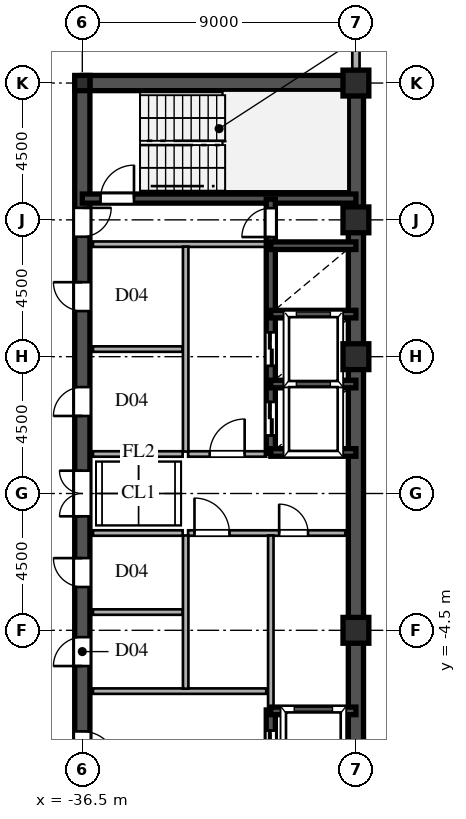
"""IFC4 building model, lengths in metres.
Left out: names, types, materials, properties, quantities, classifications, styles, units other than length and angle.
Written with IfcOpenShell. Run it as: python <this file> out.ifc"""

import sys

from ifc_helpers import new_model, si_unit, direction, frame, frame_2d, origin, origin_2d, place, context, subcontext, project, spatial, rectangle, hollow_rectangle, i_section, extrude, source, transform, mapped, element, fill, save


model = new_model("IFC4")
c1 = context("Model", 3, precision=1e-05, world=origin(), true_north=direction((0.0, 1.0)))
c2 = subcontext(c1, "Body", "Model", "MODEL_VIEW")
j1 = project(units=[si_unit("LENGTHUNIT", "METRE"), si_unit("PLANEANGLEUNIT", "RADIAN")], contexts=[c1])
p1 = place(None, origin())
s1 = spatial("IfcSite", under=j1, at=p1, CompositionType="ELEMENT")
p2 = place(p1, origin())
s2 = spatial("IfcBuilding", under=s1, at=p2, CompositionType="ELEMENT")
p3 = place(p2, frame((0.0, 0.0, 210.3)))
s3 = spatial("IfcBuildingStorey", under=s2, at=p3, CompositionType="ELEMENT", Elevation=210.3)
m1 = source(origin(), c2, "Body", "SweptSolid", [
    extrude(hollow_rectangle(XDim=0.85, YDim=0.85, WallThickness=0.036, at=origin_2d()), origin(), (0.0, 0.0, 1.0), 3.6),
])
for number, where, z_axis, x_axis in (
    (1, (-27.5, -4.5, 0.0), (0.0, 0.0, 1.0), (1.0, 0.0, 0.0)),
    (2, (-27.5, 4.5, 0.0), (0.0, 0.0, 1.0), (1.0, 0.0, 0.0)),
    (3, (-27.5, 9.0, 0.0), (0.0, 0.0, 1.0), (1.0, 0.0, 0.0)),
    (4, (-27.5, 13.5, 0.0), (0.0, 0.0, 1.0), (1.0, 0.0, 0.0)),
):
    element("IfcColumn", number, at=place(p3, frame(where, z_axis=z_axis, x_axis=x_axis)), inside=s3, PredefinedType="COLUMN", context=c2, shape_type="MappedRepresentation", body=[
        mapped(m1, transform((0.0, 0.0, 0.0), scale=1.0)),
    ])
m2 = source(origin(), c2, "Body", "SweptSolid", [
    extrude(i_section(OverallWidth=0.5, OverallDepth=0.5, WebThickness=0.02, FlangeThickness=0.032, at=origin_2d()), origin(), (0.0, 0.0, 1.0), 3.6),
])
p4 = place(p3, frame((-36.5, 13.5, 0.0), z_axis=(0.0, 0.0, 1.0), x_axis=(1.0, 0.0, 0.0)))
e5 = element("IfcColumn", 5, at=p4, inside=s3, PredefinedType="COLUMN", context=c2, shape_type="MappedRepresentation", body=[
    mapped(m2, transform((0.0, 0.0, 0.0), scale=1.0)),
])
p5 = place(p3, frame((-27.5, 13.755, 0.0), z_axis=(0.0, 0.0, 1.0), x_axis=(0.0, 1.0, 0.0)))
e6 = element("IfcWall", 6, at=p5, inside=s3, PredefinedType="SOLIDWALL", context=c2, shape_type="SweptSolid", body=[
    extrude(rectangle(XDim=0.62, YDim=0.24, at=frame_2d((0.31, 0.0))), origin(), (0.0, 0.0, 1.0), 2.88),
])
p6 = place(p3, frame((-27.5, 14.375, 0.0), z_axis=(0.0, 0.0, 1.0), x_axis=(0.0, 1.0, 0.0)))
e7 = element("IfcWall", 7, at=p6, inside=s3, PredefinedType="SOLIDWALL", context=c2, shape_type="SweptSolid", body=[
    extrude(rectangle(XDim=1.605, YDim=0.24, at=frame_2d((0.803, 0.0))), origin(), (0.0, 0.0, 1.0), 3.38),
])
for number, where, z_axis, x_axis in (
    (8, (-27.5, -13.5, 0.0), (0.0, 0.0, 1.0), (0.0, 1.0, 0.0)),
    (9, (-27.5, 1.3, 0.0), (0.0, 0.0, 1.0), (0.0, 1.0, 0.0)),
):
    element("IfcWall", number, at=place(p3, frame(where, z_axis=z_axis, x_axis=x_axis)), inside=s3, PredefinedType="SHEAR", context=c2, shape_type="SweptSolid", body=[
        extrude(rectangle(XDim=12.2, YDim=0.5, at=frame_2d((6.1, 0.0))), origin(), (0.0, 0.0, 1.0), 3.38),
    ])
p7 = place(p3, frame((-27.5, -1.3, 0.0), z_axis=(0.0, 0.0, 1.0), x_axis=(0.0, 1.0, 0.0)))
e10 = element("IfcWall", 10, at=p7, inside=s3, PredefinedType="SHEAR", context=c2, shape_type="SweptSolid", body=[
    extrude(rectangle(XDim=2.6, YDim=0.5, at=frame_2d((1.3, 0.0))), origin(), (0.0, 0.0, 1.0), 3.38),
])
p8 = place(p3, frame((-36.5, 13.5, 0.0), z_axis=(0.0, 0.0, 1.0), x_axis=(1.0, 0.0, 0.0)))
e11 = element("IfcWall", 11, at=p8, inside=s3, PredefinedType="SHEAR", context=c2, shape_type="SweptSolid", body=[
    extrude(rectangle(XDim=9.0, YDim=0.5, at=frame_2d((4.5, 0.0))), origin(), (0.0, 0.0, 1.0), 3.38),
])
p9 = place(p3, frame((-36.5, -13.65, 0.0), z_axis=(0.0, 0.0, 1.0), x_axis=(0.0, 1.0, 0.0)))
e12 = element("IfcWall", 12, at=p9, inside=s3, PredefinedType="SHEAR", context=c2, shape_type="SweptSolid", body=[
    extrude(rectangle(XDim=7.15, YDim=0.5, at=frame_2d((3.575, 0.0))), origin(), (0.0, 0.0, 1.0), 3.38),
])
p10 = place(p9, frame((4.675, 0.0, 0.0)))
e13 = element("IfcOpeningElement", 13, at=p10, cuts=e12, PredefinedType="OPENING", context=c2, shape_type="SweptSolid", body=[
    extrude(rectangle(XDim=1.15, YDim=2.2, at=frame_2d((0.575, 1.1))), frame((0.0, 0.26, 0.0), z_axis=(0.0, -1.0, 0.0), x_axis=(1.0, 0.0, 0.0)), (0.0, 0.0, 1.0), 0.52),
])
p11 = place(p3, frame((-36.5, -1.3, 0.0), z_axis=(0.0, 0.0, 1.0), x_axis=(0.0, 1.0, 0.0)))
e14 = element("IfcWall", 14, at=p11, inside=s3, PredefinedType="SHEAR", context=c2, shape_type="SweptSolid", body=[
    extrude(rectangle(XDim=2.6, YDim=0.5, at=frame_2d((1.3, 0.0))), origin(), (0.0, 0.0, 1.0), 3.38),
])
p12 = place(p11, frame((0.55, 0.0, 0.0)))
e15 = element("IfcOpeningElement", 15, at=p12, cuts=e14, PredefinedType="OPENING", context=c2, shape_type="SweptSolid", body=[
    extrude(rectangle(XDim=1.5, YDim=2.3, at=frame_2d((0.75, 1.15))), frame((0.0, 0.26, 0.0), z_axis=(0.0, -1.0, 0.0), x_axis=(1.0, 0.0, 0.0)), (0.0, 0.0, 1.0), 0.52),
])
p13 = place(p3, frame((-36.5, 8.2, 0.0), z_axis=(0.0, 0.0, 1.0), x_axis=(0.0, 1.0, 0.0)))
e16 = element("IfcWall", 16, at=p13, inside=s3, PredefinedType="SHEAR", context=c2, shape_type="SweptSolid", body=[
    extrude(rectangle(XDim=5.45, YDim=0.5, at=frame_2d((2.725, 0.0))), origin(), (0.0, 0.0, 1.0), 3.38),
])
p14 = place(p13, frame((0.245, 0.0, 0.0)))
e17 = element("IfcOpeningElement", 17, at=p14, cuts=e16, PredefinedType="OPENING", context=c2, shape_type="SweptSolid", body=[
    extrude(rectangle(XDim=0.95, YDim=2.15, at=frame_2d((0.475, 1.075))), frame((0.0, 0.26, 0.0), z_axis=(0.0, -1.0, 0.0), x_axis=(1.0, 0.0, 0.0)), (0.0, 0.0, 1.0), 0.52),
])
p15 = place(p3, frame((-36.5, -6.5, 0.0), z_axis=(0.0, 0.0, 1.0), x_axis=(0.0, 1.0, 0.0)))
e18 = element("IfcWall", 18, at=p15, inside=s3, PredefinedType="SHEAR", context=c2, shape_type="SweptSolid", body=[
    extrude(rectangle(XDim=2.6, YDim=0.5, at=frame_2d((1.3, 0.0))), origin(), (0.0, 0.0, 1.0), 3.38),
])
p16 = place(p15, frame((0.825, 0.0, 0.0)))
e19 = element("IfcOpeningElement", 19, at=p16, cuts=e18, PredefinedType="OPENING", context=c2, shape_type="SweptSolid", body=[
    extrude(rectangle(XDim=0.95, YDim=2.15, at=frame_2d((0.475, 1.075))), frame((0.0, 0.26, 0.0), z_axis=(0.0, -1.0, 0.0), x_axis=(1.0, 0.0, 0.0)), (0.0, 0.0, 1.0), 0.52),
])
p17 = place(p3, frame((-36.5, -3.9, 0.0), z_axis=(0.0, 0.0, 1.0), x_axis=(0.0, 1.0, 0.0)))
e20 = element("IfcWall", 20, at=p17, inside=s3, PredefinedType="SHEAR", context=c2, shape_type="SweptSolid", body=[
    extrude(rectangle(XDim=2.6, YDim=0.5, at=frame_2d((1.3, 0.0))), origin(), (0.0, 0.0, 1.0), 3.38),
])
p18 = place(p17, frame((0.825, 0.0, 0.0)))
e21 = element("IfcOpeningElement", 21, at=p18, cuts=e20, PredefinedType="OPENING", context=c2, shape_type="SweptSolid", body=[
    extrude(rectangle(XDim=0.95, YDim=2.15, at=frame_2d((0.475, 1.075))), frame((0.0, 0.26, 0.0), z_axis=(0.0, -1.0, 0.0), x_axis=(1.0, 0.0, 0.0)), (0.0, 0.0, 1.0), 0.52),
])
p19 = place(p3, frame((-36.5, 1.3, 0.0), z_axis=(0.0, 0.0, 1.0), x_axis=(0.0, 1.0, 0.0)))
e22 = element("IfcWall", 22, at=p19, inside=s3, PredefinedType="SHEAR", context=c2, shape_type="SweptSolid", body=[
    extrude(rectangle(XDim=3.45, YDim=0.5, at=frame_2d((1.725, 0.0))), origin(), (0.0, 0.0, 1.0), 3.38),
])
p20 = place(p19, frame((1.25, 0.0, 0.0)))
e23 = element("IfcOpeningElement", 23, at=p20, cuts=e22, PredefinedType="OPENING", context=c2, shape_type="SweptSolid", body=[
    extrude(rectangle(XDim=0.95, YDim=2.15, at=frame_2d((0.475, 1.075))), frame((0.0, 0.26, 0.0), z_axis=(0.0, -1.0, 0.0), x_axis=(1.0, 0.0, 0.0)), (0.0, 0.0, 1.0), 0.52),
])
p21 = place(p3, frame((-36.5, 4.75, 0.0), z_axis=(0.0, 0.0, 1.0), x_axis=(0.0, 1.0, 0.0)))
e24 = element("IfcWall", 24, at=p21, inside=s3, PredefinedType="SHEAR", context=c2, shape_type="SweptSolid", body=[
    extrude(rectangle(XDim=3.45, YDim=0.5, at=frame_2d((1.725, 0.0))), origin(), (0.0, 0.0, 1.0), 3.38),
])
p22 = place(p21, frame((1.25, 0.0, 0.0)))
e25 = element("IfcOpeningElement", 25, at=p22, cuts=e24, PredefinedType="OPENING", context=c2, shape_type="SweptSolid", body=[
    extrude(rectangle(XDim=0.95, YDim=2.15, at=frame_2d((0.475, 1.075))), frame((0.0, 0.26, 0.0), z_axis=(0.0, -1.0, 0.0), x_axis=(1.0, 0.0, 0.0)), (0.0, 0.0, 1.0), 0.52),
])
p23 = place(p3, frame((-36.5, 9.7, 0.0), z_axis=(0.0, 0.0, 1.0), x_axis=(1.0, 0.0, 0.0)))
e26 = element("IfcWall", 26, at=p23, inside=s3, PredefinedType="SHEAR", context=c2, shape_type="SweptSolid", body=[
    extrude(rectangle(XDim=9.0, YDim=0.3, at=frame_2d((4.5, 0.0))), origin(), (0.0, 0.0, 1.0), 3.38),
])
p24 = place(p23, frame((0.6, 0.0, 0.0)))
e27 = element("IfcOpeningElement", 27, at=p24, cuts=e26, PredefinedType="OPENING", context=c2, shape_type="SweptSolid", body=[
    extrude(rectangle(XDim=1.1, YDim=2.2, at=frame_2d((0.55, 1.1))), frame((0.0, 0.16, 0.0), z_axis=(0.0, -1.0, 0.0), x_axis=(1.0, 0.0, 0.0)), (0.0, 0.0, 1.0), 0.32),
])
for number, where, z_axis, x_axis in (
    (28, (-30.3, -7.15, 0.0), (0.0, 0.0, 1.0), (1.0, 0.0, 0.0)),
    (29, (-30.3, 1.35, 0.0), (0.0, 0.0, 1.0), (1.0, 0.0, 0.0)),
    (30, (-30.3, 3.6, 0.0), (0.0, 0.0, 1.0), (1.0, 0.0, 0.0)),
    (31, (-30.3, 5.9, 0.0), (0.0, 0.0, 1.0), (1.0, 0.0, 0.0)),
    (32, (-30.3, 8.15, 0.0), (0.0, 0.0, 1.0), (1.0, 0.0, 0.0)),
):
    element("IfcWall", number, at=place(p3, frame(where, z_axis=z_axis, x_axis=x_axis)), inside=s3, PredefinedType="SHEAR", context=c2, shape_type="SweptSolid", body=[
        extrude(rectangle(XDim=2.8, YDim=0.25, at=frame_2d((1.4, 0.0))), origin(), (0.0, 0.0, 1.0), 3.38),
    ])
p25 = place(p3, frame((-30.3, -9.68, 0.0), z_axis=(0.0, 0.0, 1.0), x_axis=(0.0, 1.0, 0.0)))
e33 = element("IfcWall", 33, at=p25, inside=s3, PredefinedType="SHEAR", context=c2, shape_type="SweptSolid", body=[
    extrude(rectangle(XDim=2.56, YDim=0.3, at=frame_2d((1.28, 0.0))), origin(), (0.0, 0.0, 1.0), 3.38),
])
p26 = place(p25, frame((0.68, 0.0, 0.0)))
e34 = element("IfcOpeningElement", 34, at=p26, cuts=e33, PredefinedType="OPENING", context=c2, shape_type="SweptSolid", body=[
    extrude(rectangle(XDim=1.2, YDim=2.25, at=frame_2d((0.6, 1.125))), frame((0.0, 0.16, 0.0), z_axis=(0.0, -1.0, 0.0), x_axis=(1.0, 0.0, 0.0)), (0.0, 0.0, 1.0), 0.32),
])
p27 = place(p3, frame((-30.3, 1.32, 0.0), z_axis=(0.0, 0.0, 1.0), x_axis=(0.0, 1.0, 0.0)))
e35 = element("IfcWall", 35, at=p27, inside=s3, PredefinedType="SHEAR", context=c2, shape_type="SweptSolid", body=[
    extrude(rectangle(XDim=2.28, YDim=0.3, at=frame_2d((1.14, 0.0))), origin(), (0.0, 0.0, 1.0), 3.38),
])
p28 = place(p27, frame((0.59, 0.0, 0.0)))
e36 = element("IfcOpeningElement", 36, at=p28, cuts=e35, PredefinedType="OPENING", context=c2, shape_type="SweptSolid", body=[
    extrude(rectangle(XDim=1.1, YDim=2.2, at=frame_2d((0.55, 1.1))), frame((0.0, 0.16, 0.0), z_axis=(0.0, -1.0, 0.0), x_axis=(1.0, 0.0, 0.0)), (0.0, 0.0, 1.0), 0.32),
])
p29 = place(p3, frame((-30.3, 3.6, 0.0), z_axis=(0.0, 0.0, 1.0), x_axis=(0.0, 1.0, 0.0)))
e37 = element("IfcWall", 37, at=p29, inside=s3, PredefinedType="SHEAR", context=c2, shape_type="SweptSolid", body=[
    extrude(rectangle(XDim=2.3, YDim=0.3, at=frame_2d((1.15, 0.0))), origin(), (0.0, 0.0, 1.0), 3.38),
])
p30 = place(p29, frame((0.6, 0.0, 0.0)))
e38 = element("IfcOpeningElement", 38, at=p30, cuts=e37, PredefinedType="OPENING", context=c2, shape_type="SweptSolid", body=[
    extrude(rectangle(XDim=1.1, YDim=2.2, at=frame_2d((0.55, 1.1))), frame((0.0, 0.16, 0.0), z_axis=(0.0, -1.0, 0.0), x_axis=(1.0, 0.0, 0.0)), (0.0, 0.0, 1.0), 0.32),
])
p31 = place(p3, frame((-30.3, 5.9, 0.0), z_axis=(0.0, 0.0, 1.0), x_axis=(0.0, 1.0, 0.0)))
e39 = element("IfcWall", 39, at=p31, inside=s3, PredefinedType="SHEAR", context=c2, shape_type="SweptSolid", body=[
    extrude(rectangle(XDim=2.25, YDim=0.3, at=frame_2d((1.125, 0.0))), origin(), (0.0, 0.0, 1.0), 3.38),
])
p32 = place(p3, frame((-30.3, 8.15, 0.0), z_axis=(0.0, 0.0, 1.0), x_axis=(0.0, 1.0, 0.0)))
e40 = element("IfcWall", 40, at=p32, inside=s3, PredefinedType="SHEAR", context=c2, shape_type="SweptSolid", body=[
    extrude(rectangle(XDim=1.53, YDim=0.3, at=frame_2d((0.765, 0.0))), origin(), (0.0, 0.0, 1.0), 3.38),
])
p33 = place(p32, frame((0.285, 0.0, 0.0)))
e41 = element("IfcOpeningElement", 41, at=p33, cuts=e40, PredefinedType="OPENING", context=c2, shape_type="SweptSolid", body=[
    extrude(rectangle(XDim=0.95, YDim=2.15, at=frame_2d((0.475, 1.075))), frame((0.0, 0.16, 0.0), z_axis=(0.0, -1.0, 0.0), x_axis=(1.0, 0.0, 0.0)), (0.0, 0.0, 1.0), 0.32),
])
for number, where, z_axis, x_axis in (
    (42, (-36.15, -6.5, 0.0), (0.0, 0.0, 1.0), (1.0, 0.0, 0.0)),
    (43, (-36.15, 8.2, 0.0), (0.0, 0.0, 1.0), (1.0, 0.0, 0.0)),
):
    element("IfcWall", number, at=place(p3, frame(where, z_axis=z_axis, x_axis=x_axis)), inside=s3, PredefinedType="PARTITIONING", context=c2, shape_type="SweptSolid", body=[
        extrude(rectangle(XDim=5.7, YDim=0.18, at=frame_2d((2.85, 0.0))), origin(), (0.0, 0.0, 1.0), 3.38),
    ])
p34 = place(p3, frame((-33.1, -6.42, 0.0), z_axis=(0.0, 0.0, 1.0), x_axis=(0.0, 1.0, 0.0)))
e44 = element("IfcWall", 44, at=p34, inside=s3, PredefinedType="PARTITIONING", context=c2, shape_type="SweptSolid", body=[
    extrude(rectangle(XDim=5.04, YDim=0.18, at=frame_2d((2.52, 0.0))), origin(), (0.0, 0.0, 1.0), 3.38),
])
p35 = place(p3, frame((-33.1, 1.38, 0.0), z_axis=(0.0, 0.0, 1.0), x_axis=(0.0, 1.0, 0.0)))
e45 = element("IfcWall", 45, at=p35, inside=s3, PredefinedType="PARTITIONING", context=c2, shape_type="SweptSolid", body=[
    extrude(rectangle(XDim=6.74, YDim=0.18, at=frame_2d((3.37, 0.0))), origin(), (0.0, 0.0, 1.0), 3.38),
])
p36 = place(p3, frame((-30.3, -1.3, 0.0), z_axis=(0.0, 0.0, 1.0), x_axis=(1.0, 0.0, 0.0)))
e46 = element("IfcWall", 46, at=p36, inside=s3, PredefinedType="PARTITIONING", context=c2, shape_type="SweptSolid", body=[
    extrude(rectangle(XDim=2.45, YDim=0.18, at=frame_2d((1.225, 0.0))), origin(), (0.0, 0.0, 1.0), 3.38),
])
p37 = place(p36, frame((0.275, 0.0, 0.0)))
e47 = element("IfcOpeningElement", 47, at=p37, cuts=e46, PredefinedType="OPENING", context=c2, shape_type="SweptSolid", body=[
    extrude(rectangle(XDim=0.95, YDim=2.15, at=frame_2d((0.475, 1.075))), frame((0.0, 0.1, 0.0), z_axis=(0.0, -1.0, 0.0), x_axis=(1.0, 0.0, 0.0)), (0.0, 0.0, 1.0), 0.2),
])
p38 = place(p3, frame((-33.02, -1.3, 0.0), z_axis=(0.0, 0.0, 1.0), x_axis=(1.0, 0.0, 0.0)))
e48 = element("IfcWall", 48, at=p38, inside=s3, PredefinedType="PARTITIONING", context=c2, shape_type="SweptSolid", body=[
    extrude(rectangle(XDim=2.72, YDim=0.18, at=frame_2d((1.36, 0.0))), origin(), (0.0, 0.0, 1.0), 3.38),
])
p39 = place(p38, frame((0.21, 0.0, 0.0)))
e49 = element("IfcOpeningElement", 49, at=p39, cuts=e48, PredefinedType="OPENING", context=c2, shape_type="SweptSolid", body=[
    extrude(rectangle(XDim=1.15, YDim=2.2, at=frame_2d((0.575, 1.1))), frame((0.0, 0.1, 0.0), z_axis=(0.0, -1.0, 0.0), x_axis=(1.0, 0.0, 0.0)), (0.0, 0.0, 1.0), 0.2),
])
p40 = place(p3, frame((-30.3, -7.12, 0.0), z_axis=(0.0, 0.0, 1.0), x_axis=(0.0, 1.0, 0.0)))
e50 = element("IfcWall", 50, at=p40, inside=s3, PredefinedType="PARTITIONING", context=c2, shape_type="SweptSolid", body=[
    extrude(rectangle(XDim=5.74, YDim=0.18, at=frame_2d((2.87, 0.0))), origin(), (0.0, 0.0, 1.0), 3.38),
])
p41 = place(p3, frame((-33.02, 1.3, 0.0), z_axis=(0.0, 0.0, 1.0), x_axis=(1.0, 0.0, 0.0)))
e51 = element("IfcWall", 51, at=p41, inside=s3, PredefinedType="PARTITIONING", context=c2, shape_type="SweptSolid", body=[
    extrude(rectangle(XDim=2.57, YDim=0.18, at=frame_2d((1.285, 0.0))), origin(), (0.0, 0.0, 1.0), 3.38),
])
p42 = place(p41, frame((0.71, 0.0, 0.0)))
e52 = element("IfcOpeningElement", 52, at=p42, cuts=e51, PredefinedType="OPENING", context=c2, shape_type="SweptSolid", body=[
    extrude(rectangle(XDim=1.15, YDim=2.2, at=frame_2d((0.575, 1.1))), frame((0.0, 0.1, 0.0), z_axis=(0.0, -1.0, 0.0), x_axis=(1.0, 0.0, 0.0)), (0.0, 0.0, 1.0), 0.2),
])
for number, where, z_axis, x_axis in (
    (53, (-36.15, -1.3, 0.0), (0.0, 0.0, 1.0), (1.0, 0.0, 0.0)),
    (54, (-36.15, 1.3, 0.0), (0.0, 0.0, 1.0), (1.0, 0.0, 0.0)),
    (55, (-36.15, -3.9, 0.0), (0.0, 0.0, 1.0), (1.0, 0.0, 0.0)),
    (56, (-36.15, 4.75, 0.0), (0.0, 0.0, 1.0), (1.0, 0.0, 0.0)),
):
    element("IfcWall", number, at=place(p3, frame(where, z_axis=z_axis, x_axis=x_axis)), inside=s3, PredefinedType="PARTITIONING", context=c2, shape_type="SweptSolid", body=[
        extrude(rectangle(XDim=2.95, YDim=0.18, at=frame_2d((1.475, 0.0))), origin(), (0.0, 0.0, 1.0), 3.38),
    ])
m3 = source(origin(), c2, "Body", "SweptSolid", [
    extrude(rectangle(XDim=1.15, YDim=2.2, at=frame_2d((0.575, 1.1))), frame((0.0, 0.025, 0.0), z_axis=(0.0, -1.0, 0.0), x_axis=(1.0, 0.0, 0.0)), (0.0, 0.0, 1.0), 0.05),
])
p43 = place(p10, frame((1.15, 0.0, 0.0), z_axis=(0.0, 0.0, 1.0), x_axis=(-1.0, 0.0, 0.0)))
e57 = element("IfcDoor", 57, at=p43, inside=s3, OperationType="SINGLE_SWING_LEFT", PredefinedType="DOOR", context=c2, shape_type="MappedRepresentation", body=[
    mapped(m3, transform((0.0, 0.0, 0.0), scale=1.0)),
])
fill(e13, e57)
m4 = source(origin(), c2, "Body", "SweptSolid", [
    extrude(rectangle(XDim=1.5, YDim=2.3, at=frame_2d((0.75, 1.15))), frame((0.0, 0.025, 0.0), z_axis=(0.0, -1.0, 0.0), x_axis=(1.0, 0.0, 0.0)), (0.0, 0.0, 1.0), 0.05),
])
p44 = place(p12, origin())
e58 = element("IfcDoor", 58, at=p44, inside=s3, OperationType="DOUBLE_SWING_LEFT", PredefinedType="DOOR", context=c2, shape_type="MappedRepresentation", body=[
    mapped(m4, transform((0.0, 0.0, 0.0), scale=1.0)),
])
fill(e15, e58)
m5 = source(origin(), c2, "Body", "SweptSolid", [
    extrude(rectangle(XDim=0.95, YDim=2.15, at=frame_2d((0.475, 1.075))), frame((0.0, 0.025, 0.0), z_axis=(0.0, -1.0, 0.0), x_axis=(1.0, 0.0, 0.0)), (0.0, 0.0, 1.0), 0.05),
])
p45 = place(p14, frame((0.95, 0.0, 0.0), z_axis=(0.0, 0.0, 1.0), x_axis=(-1.0, 0.0, 0.0)))
e59 = element("IfcDoor", 59, at=p45, inside=s3, OperationType="SINGLE_SWING_RIGHT", PredefinedType="DOOR", context=c2, shape_type="MappedRepresentation", body=[
    mapped(m5, transform((0.0, 0.0, 0.0), scale=1.0)),
])
fill(e17, e59)
p46 = place(p16, origin())
e60 = element("IfcDoor", 60, at=p46, inside=s3, OperationType="SINGLE_SWING_LEFT", PredefinedType="DOOR", context=c2, shape_type="MappedRepresentation", body=[
    mapped(m5, transform((0.0, 0.0, 0.0), scale=1.0)),
])
fill(e19, e60)
p47 = place(p18, origin())
e61 = element("IfcDoor", 61, at=p47, inside=s3, OperationType="SINGLE_SWING_RIGHT", PredefinedType="DOOR", context=c2, shape_type="MappedRepresentation", body=[
    mapped(m5, transform((0.0, 0.0, 0.0), scale=1.0)),
])
fill(e21, e61)
p48 = place(p20, origin())
e62 = element("IfcDoor", 62, at=p48, inside=s3, OperationType="SINGLE_SWING_LEFT", PredefinedType="DOOR", context=c2, shape_type="MappedRepresentation", body=[
    mapped(m5, transform((0.0, 0.0, 0.0), scale=1.0)),
])
fill(e23, e62)
p49 = place(p22, origin())
e63 = element("IfcDoor", 63, at=p49, inside=s3, OperationType="SINGLE_SWING_RIGHT", PredefinedType="DOOR", context=c2, shape_type="MappedRepresentation", body=[
    mapped(m5, transform((0.0, 0.0, 0.0), scale=1.0)),
])
fill(e25, e63)
m6 = source(origin(), c2, "Body", "SweptSolid", [
    extrude(rectangle(XDim=1.1, YDim=2.2, at=frame_2d((0.55, 1.1))), frame((0.0, 0.025, 0.0), z_axis=(0.0, -1.0, 0.0), x_axis=(1.0, 0.0, 0.0)), (0.0, 0.0, 1.0), 0.05),
])
p50 = place(p24, origin())
e64 = element("IfcDoor", 64, at=p50, inside=s3, OperationType="SINGLE_SWING_RIGHT", PredefinedType="DOOR", context=c2, shape_type="MappedRepresentation", body=[
    mapped(m6, transform((0.0, 0.0, 0.0), scale=1.0)),
])
fill(e27, e64)
m7 = source(origin(), c2, "Body", "SweptSolid", [
    extrude(rectangle(XDim=1.2, YDim=2.25, at=frame_2d((0.6, 1.125))), frame((0.0, 0.025, 0.0), z_axis=(0.0, -1.0, 0.0), x_axis=(1.0, 0.0, 0.0)), (0.0, 0.0, 1.0), 0.05),
])
p51 = place(p26, origin())
e65 = element("IfcDoor", 65, at=p51, inside=s3, OperationType="DOUBLE_DOOR_SLIDING", PredefinedType="DOOR", context=c2, shape_type="MappedRepresentation", body=[
    mapped(m7, transform((0.0, 0.0, 0.0), scale=1.0)),
])
fill(e34, e65)
m8 = source(origin(), c2, "Body", "SweptSolid", [
    extrude(rectangle(XDim=1.1, YDim=2.2, at=frame_2d((0.55, 1.1))), frame((0.0, 0.025, 0.0), z_axis=(0.0, -1.0, 0.0), x_axis=(1.0, 0.0, 0.0)), (0.0, 0.0, 1.0), 0.05),
])
p52 = place(p28, origin())
e66 = element("IfcDoor", 66, at=p52, inside=s3, OperationType="DOUBLE_DOOR_SLIDING", PredefinedType="DOOR", context=c2, shape_type="MappedRepresentation", body=[
    mapped(m8, transform((0.0, 0.0, 0.0), scale=1.0)),
])
fill(e36, e66)
p53 = place(p30, origin())
e67 = element("IfcDoor", 67, at=p53, inside=s3, OperationType="DOUBLE_DOOR_SLIDING", PredefinedType="DOOR", context=c2, shape_type="MappedRepresentation", body=[
    mapped(m8, transform((0.0, 0.0, 0.0), scale=1.0)),
])
fill(e38, e67)
p54 = place(p33, origin())
e68 = element("IfcDoor", 68, at=p54, inside=s3, OperationType="SINGLE_SWING_LEFT", PredefinedType="DOOR", context=c2, shape_type="MappedRepresentation", body=[
    mapped(m5, transform((0.0, 0.0, 0.0), scale=1.0)),
])
fill(e41, e68)
p55 = place(p37, origin())
e69 = element("IfcDoor", 69, at=p55, inside=s3, OperationType="SINGLE_SWING_LEFT", PredefinedType="DOOR", context=c2, shape_type="MappedRepresentation", body=[
    mapped(m5, transform((0.0, 0.0, 0.0), scale=1.0)),
])
fill(e47, e69)
p56 = place(p39, origin())
e70 = element("IfcDoor", 70, at=p56, inside=s3, OperationType="SINGLE_SWING_LEFT", PredefinedType="DOOR", context=c2, shape_type="MappedRepresentation", body=[
    mapped(m3, transform((0.0, 0.0, 0.0), scale=1.0)),
])
fill(e49, e70)
p57 = place(p42, origin())
e71 = element("IfcDoor", 71, at=p57, inside=s3, OperationType="SINGLE_SWING_RIGHT", PredefinedType="DOOR", context=c2, shape_type="MappedRepresentation", body=[
    mapped(m3, transform((0.0, 0.0, 0.0), scale=1.0)),
])
fill(e52, e71)
save(model, sys.argv[1])
